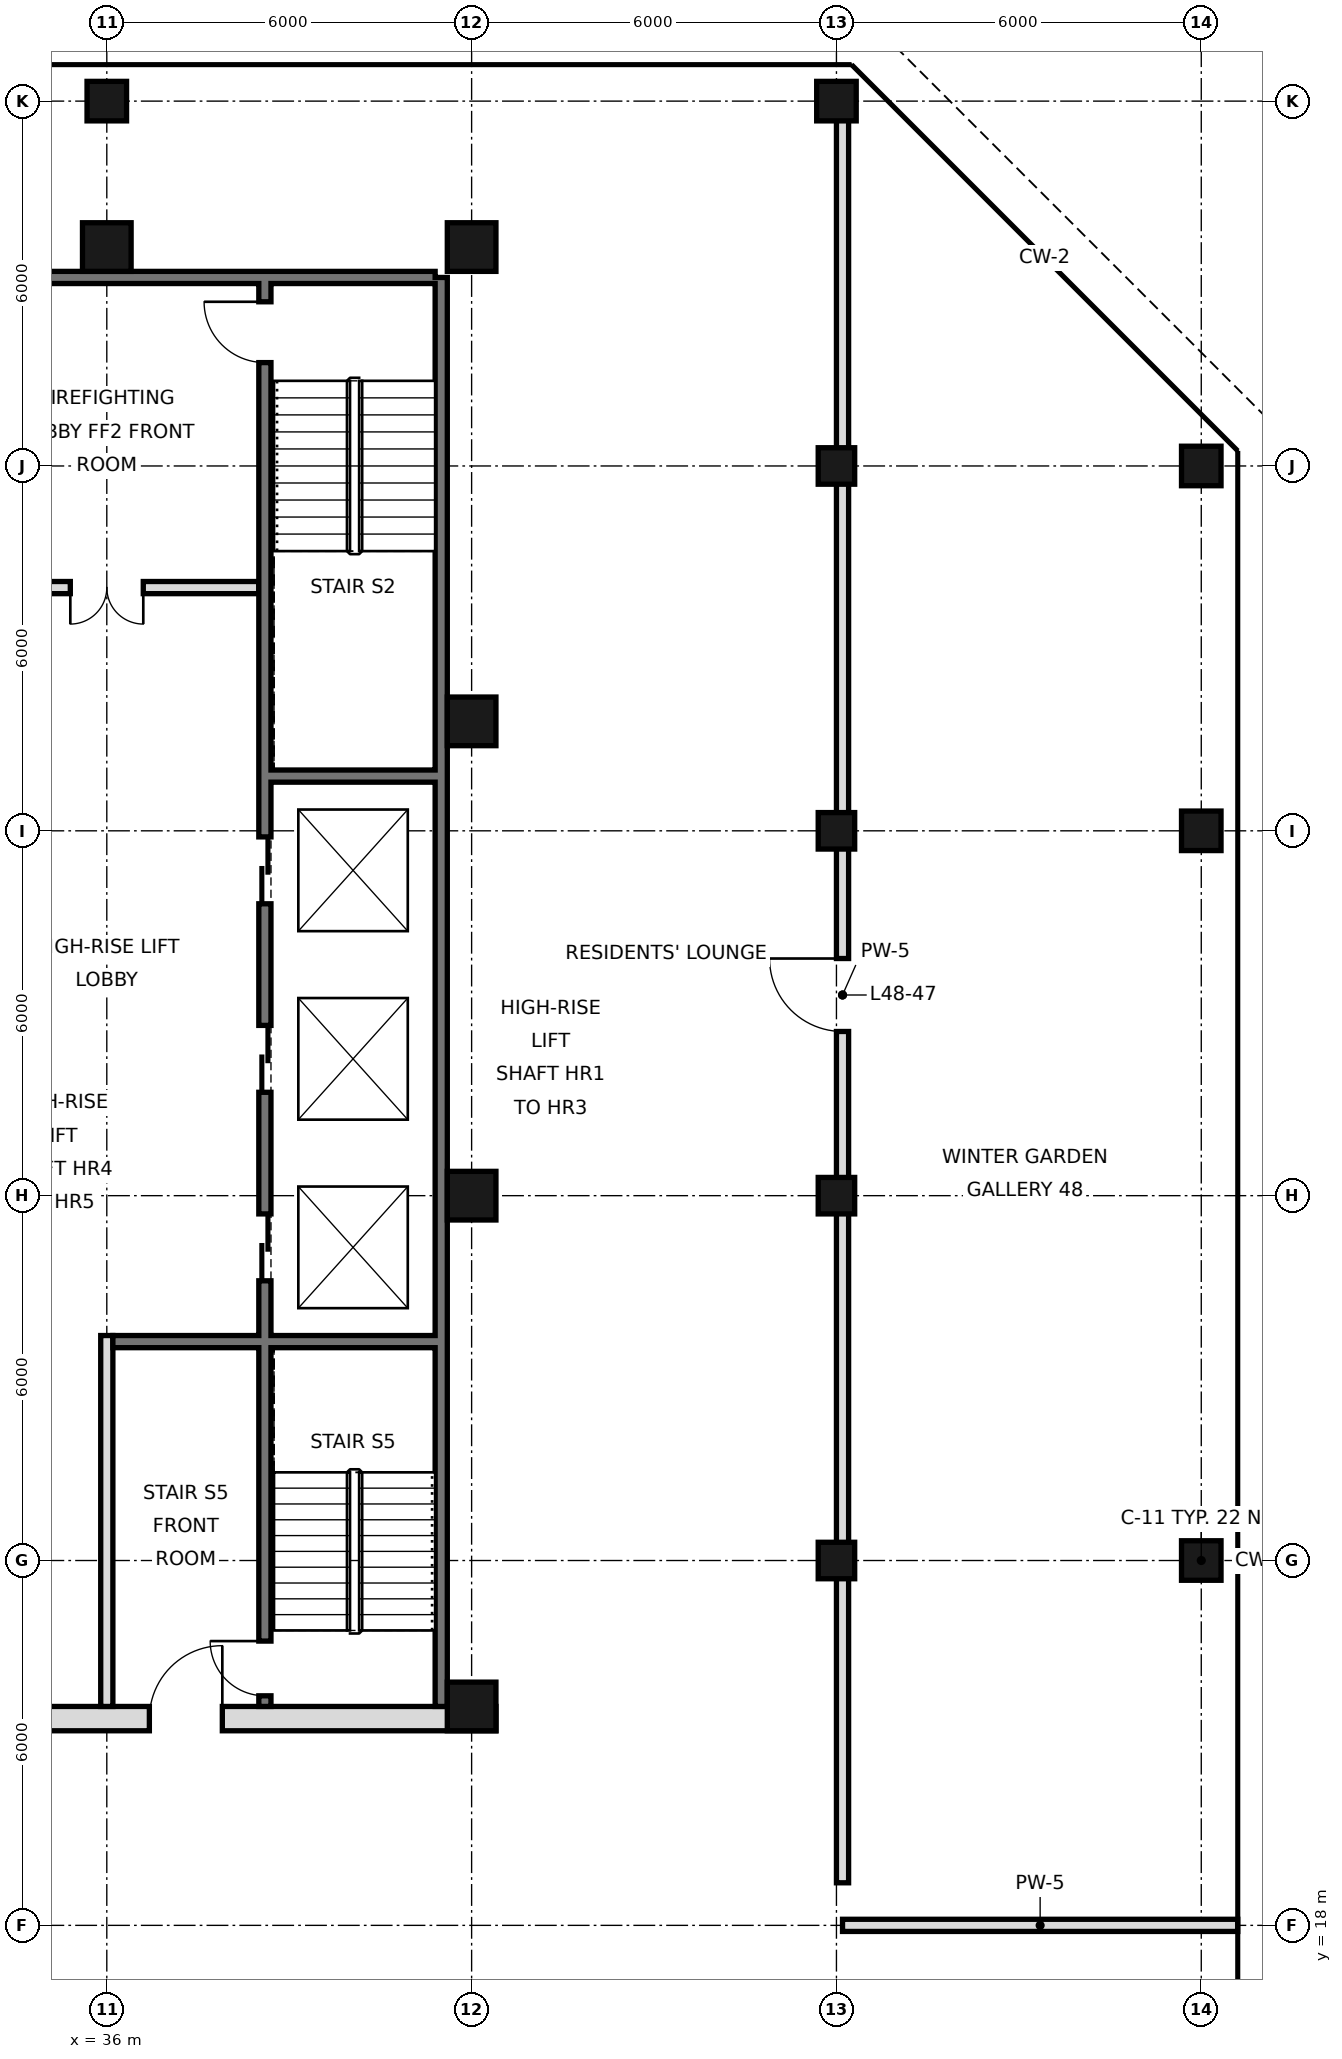
"""IFC4 building model, lengths in metres.
Left out: names, types, materials, properties, quantities, classifications, styles, units other than length and angle.
Written with IfcOpenShell. Run it as: python <this file> out.ifc"""

import sys

from ifc_helpers import new_model, si_unit, direction, frame, frame_2d, origin, origin_2d, place, context, subcontext, project, spatial, rectangle, hollow_rectangle, extrude, element, fill, save


model = new_model("IFC4")
c1 = context("Model", 3, precision=1e-05, world=origin(), true_north=direction((0.0, 1.0)))
c2 = subcontext(c1, "Body", "Model", "MODEL_VIEW")
j1 = project(units=[si_unit("LENGTHUNIT", "METRE"), si_unit("PLANEANGLEUNIT", "RADIAN")], contexts=[c1])
p1 = place(None, origin())
s1 = spatial("IfcSite", under=j1, at=p1, CompositionType="ELEMENT")
p2 = place(p1, origin())
s2 = spatial("IfcBuilding", under=s1, at=p2, CompositionType="ELEMENT")
p3 = place(p2, frame((0.0, 0.0, 206.4)))
s3 = spatial("IfcBuildingStorey", under=s2, at=p3, CompositionType="ELEMENT", Elevation=206.4)
p4 = place(p3, frame((36.0, 45.6, 0.0), z_axis=(0.0, 0.0, 1.0), x_axis=(1.0, 0.0, 0.0)))
e1 = element("IfcColumn", 1, at=p4, inside=s3, PredefinedType="COLUMN", context=c2, shape_type="SweptSolid", body=[
    extrude(hollow_rectangle(XDim=0.8, YDim=0.8, WallThickness=0.04, at=origin_2d()), origin(), (0.0, 0.0, 1.0), 3.6),
])
p5 = place(p3, frame((36.0, 48.0, 0.0), z_axis=(0.0, 0.0, 1.0), x_axis=(1.0, 0.0, 0.0)))
e2 = element("IfcColumn", 2, at=p5, inside=s3, PredefinedType="COLUMN", context=c2, shape_type="SweptSolid", body=[
    extrude(hollow_rectangle(XDim=0.65, YDim=0.65, WallThickness=0.032, at=origin_2d()), origin(), (0.0, 0.0, 1.0), 3.6),
])
for number, where, z_axis, x_axis in (
    (3, (42.0, 21.6, 0.0), (0.0, 0.0, 1.0), (1.0, 0.0, 0.0)),
    (4, (42.0, 30.0, 0.0), (0.0, 0.0, 1.0), (1.0, 0.0, 0.0)),
    (5, (42.0, 37.8, 0.0), (0.0, 0.0, 1.0), (1.0, 0.0, 0.0)),
    (6, (42.0, 45.6, 0.0), (0.0, 0.0, 1.0), (1.0, 0.0, 0.0)),
):
    element("IfcColumn", number, at=place(p3, frame(where, z_axis=z_axis, x_axis=x_axis)), inside=s3, PredefinedType="COLUMN", context=c2, shape_type="SweptSolid", body=[
        extrude(hollow_rectangle(XDim=0.8, YDim=0.8, WallThickness=0.04, at=origin_2d()), origin(), (0.0, 0.0, 1.0), 3.6),
    ])
for number, where, z_axis, x_axis in (
    (7, (48.0, 24.0, 0.0), (0.0, 0.0, 1.0), (1.0, 0.0, 0.0)),
    (8, (48.0, 30.0, 0.0), (0.0, 0.0, 1.0), (1.0, 0.0, 0.0)),
    (9, (48.0, 36.0, 0.0), (0.0, 0.0, 1.0), (1.0, 0.0, 0.0)),
    (10, (48.0, 42.0, 0.0), (0.0, 0.0, 1.0), (1.0, 0.0, 0.0)),
):
    element("IfcColumn", number, at=place(p3, frame(where, z_axis=z_axis, x_axis=x_axis)), inside=s3, PredefinedType="COLUMN", context=c2, shape_type="SweptSolid", body=[
        extrude(hollow_rectangle(XDim=0.6, YDim=0.6, WallThickness=0.028, at=origin_2d()), origin(), (0.0, 0.0, 1.0), 3.6),
    ])
for number, where, z_axis, x_axis in (
    (11, (48.0, 48.0, 0.0), (0.0, 0.0, 1.0), (1.0, 0.0, 0.0)),
    (12, (54.0, 24.0, 0.0), (0.0, 0.0, 1.0), (1.0, 0.0, 0.0)),
    (13, (54.0, 36.0, 0.0), (0.0, 0.0, 1.0), (1.0, 0.0, 0.0)),
    (14, (54.0, 42.0, 0.0), (0.0, 0.0, 1.0), (1.0, 0.0, 0.0)),
):
    element("IfcColumn", number, at=place(p3, frame(where, z_axis=z_axis, x_axis=x_axis)), inside=s3, PredefinedType="COLUMN", context=c2, shape_type="SweptSolid", body=[
        extrude(hollow_rectangle(XDim=0.65, YDim=0.65, WallThickness=0.032, at=origin_2d()), origin(), (0.0, 0.0, 1.0), 3.6),
    ])
p6 = place(p3, frame((48.1, 18.7, 0.0), z_axis=(0.0, 0.0, 1.0), x_axis=(0.0, 1.0, 0.0)))
e15 = element("IfcWall", 15, at=p6, inside=s3, PredefinedType="SOLIDWALL", context=c2, shape_type="SweptSolid", body=[
    extrude(rectangle(XDim=29.2, YDim=0.2, at=frame_2d((14.6, 0.0))), origin(), (0.0, 0.0, 1.0), 2.68),
])
p7 = place(p6, frame((14.0, 0.0, 0.0)))
e16 = element("IfcOpeningElement", 16, at=p7, cuts=e15, PredefinedType="OPENING", context=c2, shape_type="SweptSolid", body=[
    extrude(rectangle(XDim=1.2, YDim=2.4, at=frame_2d((0.6, 1.2))), frame((0.0, 0.11, 0.0), z_axis=(0.0, -1.0, 0.0), x_axis=(1.0, 0.0, 0.0)), (0.0, 0.0, 1.0), 0.22),
])
p8 = place(p3, frame((48.1, 18.0, 0.0), z_axis=(0.0, 0.0, 1.0), x_axis=(1.0, 0.0, 0.0)))
e17 = element("IfcWall", 17, at=p8, inside=s3, PredefinedType="SOLIDWALL", context=c2, shape_type="SweptSolid", body=[
    extrude(rectangle(XDim=6.5, YDim=0.2, at=frame_2d((3.25, 0.0))), origin(), (0.0, 0.0, 1.0), 2.68),
])
p9 = place(p3, frame((41.5, 21.6, 0.0), z_axis=(0.0, 0.0, 1.0), x_axis=(0.0, 1.0, 0.0)))
e18 = element("IfcWall", 18, at=p9, inside=s3, PredefinedType="SOLIDWALL", context=c2, shape_type="SweptSolid", body=[
    extrude(rectangle(XDim=23.5, YDim=0.2, at=frame_2d((11.75, 0.0))), origin(), (0.0, 0.0, 1.0), 3.38),
])
p10 = place(p3, frame((6.6, 45.1, 0.0), z_axis=(0.0, 0.0, 1.0), x_axis=(1.0, 0.0, 0.0)))
e19 = element("IfcWall", 19, at=p10, inside=s3, PredefinedType="SOLIDWALL", context=c2, shape_type="SweptSolid", body=[
    extrude(rectangle(XDim=34.8, YDim=0.2, at=frame_2d((17.4, 0.0))), origin(), (0.0, 0.0, 1.0), 3.38),
])
p11 = place(p3, frame((5.6, 21.4, 0.0), z_axis=(0.0, 0.0, 1.0), x_axis=(1.0, 0.0, 0.0)))
e20 = element("IfcWall", 20, at=p11, inside=s3, PredefinedType="SOLIDWALL", context=c2, shape_type="SweptSolid", body=[
    extrude(rectangle(XDim=36.8, YDim=0.4, at=frame_2d((18.4, 0.0))), origin(), (0.0, 0.0, 1.0), 3.38),
])
p12 = place(p11, frame((8.5, 0.0, 0.0)))
e21 = element("IfcOpeningElement", 21, at=p12, cuts=e20, PredefinedType="OPENING", context=c2, shape_type="SweptSolid", body=[
    extrude(rectangle(XDim=1.8, YDim=2.1, at=frame_2d((0.9, 1.05))), frame((0.0, 0.21, 0.0), z_axis=(0.0, -1.0, 0.0), x_axis=(1.0, 0.0, 0.0)), (0.0, 0.0, 1.0), 0.42),
])
p13 = place(p11, frame((17.5, 0.0, 0.0)))
e22 = element("IfcOpeningElement", 22, at=p13, cuts=e20, PredefinedType="OPENING", context=c2, shape_type="SweptSolid", body=[
    extrude(rectangle(XDim=1.8, YDim=2.1, at=frame_2d((0.9, 1.05))), frame((0.0, 0.21, 0.0), z_axis=(0.0, -1.0, 0.0), x_axis=(1.0, 0.0, 0.0)), (0.0, 0.0, 1.0), 0.42),
])
p14 = place(p11, frame((26.5, 0.0, 0.0)))
e23 = element("IfcOpeningElement", 23, at=p14, cuts=e20, PredefinedType="OPENING", context=c2, shape_type="SweptSolid", body=[
    extrude(rectangle(XDim=1.8, YDim=2.1, at=frame_2d((0.9, 1.05))), frame((0.0, 0.21, 0.0), z_axis=(0.0, -1.0, 0.0), x_axis=(1.0, 0.0, 0.0)), (0.0, 0.0, 1.0), 0.42),
])
p15 = place(p11, frame((4.5, 0.0, 0.0)))
e24 = element("IfcOpeningElement", 24, at=p15, cuts=e20, PredefinedType="OPENING", context=c2, shape_type="SweptSolid", body=[
    extrude(rectangle(XDim=1.2, YDim=2.1, at=frame_2d((0.6, 1.05))), frame((0.0, 0.21, 0.0), z_axis=(0.0, -1.0, 0.0), x_axis=(1.0, 0.0, 0.0)), (0.0, 0.0, 1.0), 0.42),
])
p16 = place(p11, frame((31.1, 0.0, 0.0)))
e25 = element("IfcOpeningElement", 25, at=p16, cuts=e20, PredefinedType="OPENING", context=c2, shape_type="SweptSolid", body=[
    extrude(rectangle(XDim=1.2, YDim=2.1, at=frame_2d((0.6, 1.05))), frame((0.0, 0.21, 0.0), z_axis=(0.0, -1.0, 0.0), x_axis=(1.0, 0.0, 0.0)), (0.0, 0.0, 1.0), 0.42),
])
p17 = place(p3, frame((36.0, 21.6, 0.0), z_axis=(0.0, 0.0, 1.0), x_axis=(0.0, 1.0, 0.0)))
e26 = element("IfcWall", 26, at=p17, inside=s3, PredefinedType="PARTITIONING", context=c2, shape_type="SweptSolid", body=[
    extrude(rectangle(XDim=6.1, YDim=0.2, at=frame_2d((3.05, 0.0))), origin(), (0.0, 0.0, 1.0), 3.38),
])
p18 = place(p3, frame((38.6, 21.6, 0.0), z_axis=(0.0, 0.0, 1.0), x_axis=(0.0, 1.0, 0.0)))
e27 = element("IfcWall", 27, at=p18, inside=s3, PredefinedType="SOLIDWALL", context=c2, shape_type="SweptSolid", body=[
    extrude(rectangle(XDim=23.4, YDim=0.2, at=frame_2d((11.7, 0.0))), origin(), (0.0, 0.0, 1.0), 3.38),
])
p19 = place(p18, frame((7.0, 0.0, 0.0)))
e28 = element("IfcOpeningElement", 28, at=p19, cuts=e27, PredefinedType="OPENING", context=c2, shape_type="SweptSolid", body=[
    extrude(rectangle(XDim=1.1, YDim=2.1, at=frame_2d((0.55, 1.05))), frame((0.0, 0.11, 0.0), z_axis=(0.0, -1.0, 0.0), x_axis=(1.0, 0.0, 0.0)), (0.0, 0.0, 1.0), 0.22),
])
p20 = place(p18, frame((10.1, 0.0, 0.0)))
e29 = element("IfcOpeningElement", 29, at=p20, cuts=e27, PredefinedType="OPENING", context=c2, shape_type="SweptSolid", body=[
    extrude(rectangle(XDim=1.1, YDim=2.1, at=frame_2d((0.55, 1.05))), frame((0.0, 0.11, 0.0), z_axis=(0.0, -1.0, 0.0), x_axis=(1.0, 0.0, 0.0)), (0.0, 0.0, 1.0), 0.22),
])
p21 = place(p18, frame((13.2, 0.0, 0.0)))
e30 = element("IfcOpeningElement", 30, at=p21, cuts=e27, PredefinedType="OPENING", context=c2, shape_type="SweptSolid", body=[
    extrude(rectangle(XDim=1.1, YDim=2.1, at=frame_2d((0.55, 1.05))), frame((0.0, 0.11, 0.0), z_axis=(0.0, -1.0, 0.0), x_axis=(1.0, 0.0, 0.0)), (0.0, 0.0, 1.0), 0.22),
])
p22 = place(p18, frame((22.1, 0.0, 0.0)))
e31 = element("IfcOpeningElement", 31, at=p22, cuts=e27, PredefinedType="OPENING", context=c2, shape_type="SweptSolid", body=[
    extrude(rectangle(XDim=1.0, YDim=2.1, at=frame_2d((0.5, 1.05))), frame((0.0, 0.11, 0.0), z_axis=(0.0, -1.0, 0.0), x_axis=(1.0, 0.0, 0.0)), (0.0, 0.0, 1.0), 0.22),
])
p23 = place(p18, frame((0.175, 0.0, 0.0)))
e32 = element("IfcOpeningElement", 32, at=p23, cuts=e27, PredefinedType="OPENING", context=c2, shape_type="SweptSolid", body=[
    extrude(rectangle(XDim=0.9, YDim=2.1, at=frame_2d((0.45, 1.05))), frame((0.0, 0.11, 0.0), z_axis=(0.0, -1.0, 0.0), x_axis=(1.0, 0.0, 0.0)), (0.0, 0.0, 1.0), 0.22),
])
p24 = place(p3, frame((36.1, 27.6, 0.0), z_axis=(0.0, 0.0, 1.0), x_axis=(1.0, 0.0, 0.0)))
e33 = element("IfcWall", 33, at=p24, inside=s3, PredefinedType="SOLIDWALL", context=c2, shape_type="SweptSolid", body=[
    extrude(rectangle(XDim=5.3, YDim=0.2, at=frame_2d((2.65, 0.0))), origin(), (0.0, 0.0, 1.0), 3.38),
])
p25 = place(p3, frame((38.7, 36.9, 0.0), z_axis=(0.0, 0.0, 1.0), x_axis=(1.0, 0.0, 0.0)))
e34 = element("IfcWall", 34, at=p25, inside=s3, PredefinedType="SOLIDWALL", context=c2, shape_type="SweptSolid", body=[
    extrude(rectangle(XDim=2.7, YDim=0.2, at=frame_2d((1.35, 0.0))), origin(), (0.0, 0.0, 1.0), 3.38),
])
p26 = place(p3, frame((33.5, 40.0, 0.0), z_axis=(0.0, 0.0, 1.0), x_axis=(1.0, 0.0, 0.0)))
e35 = element("IfcWall", 35, at=p26, inside=s3, PredefinedType="PARTITIONING", context=c2, shape_type="SweptSolid", body=[
    extrude(rectangle(XDim=5.0, YDim=0.2, at=frame_2d((2.5, 0.0))), origin(), (0.0, 0.0, 1.0), 3.38),
])
p27 = place(p26, frame((1.9, 0.0, 0.0)))
e36 = element("IfcOpeningElement", 36, at=p27, cuts=e35, PredefinedType="OPENING", context=c2, shape_type="SweptSolid", body=[
    extrude(rectangle(XDim=1.2, YDim=2.1, at=frame_2d((0.6, 1.05))), frame((0.0, 0.11, 0.0), z_axis=(0.0, -1.0, 0.0), x_axis=(1.0, 0.0, 0.0)), (0.0, 0.0, 1.0), 0.22),
])
p28 = place(p7, frame((1.2, 0.0, 0.0), z_axis=(0.0, 0.0, 1.0), x_axis=(-1.0, 0.0, 0.0)))
e37 = element("IfcDoor", 37, at=p28, inside=s3, OperationType="SINGLE_SWING_LEFT", PredefinedType="DOOR", context=c2, shape_type="SweptSolid", body=[
    extrude(rectangle(XDim=1.2, YDim=2.4, at=frame_2d((0.6, 1.2))), frame((0.0, 0.025, 0.0), z_axis=(0.0, -1.0, 0.0), x_axis=(1.0, 0.0, 0.0)), (0.0, 0.0, 1.0), 0.05),
])
fill(e16, e37)
p29 = place(p16, frame((1.2, 0.0, 0.0), z_axis=(0.0, 0.0, 1.0), x_axis=(-1.0, 0.0, 0.0)))
e38 = element("IfcDoor", 38, at=p29, inside=s3, OperationType="SINGLE_SWING_LEFT", PredefinedType="DOOR", context=c2, shape_type="SweptSolid", body=[
    extrude(rectangle(XDim=1.2, YDim=2.1, at=frame_2d((0.6, 1.05))), frame((0.0, 0.025, 0.0), z_axis=(0.0, -1.0, 0.0), x_axis=(1.0, 0.0, 0.0)), (0.0, 0.0, 1.0), 0.05),
])
fill(e25, e38)
p30 = place(p27, frame((1.2, 0.0, 0.0), z_axis=(0.0, 0.0, 1.0), x_axis=(-1.0, 0.0, 0.0)))
e39 = element("IfcDoor", 39, at=p30, inside=s3, OperationType="DOUBLE_DOOR_SINGLE_SWING", PredefinedType="DOOR", context=c2, shape_type="SweptSolid", body=[
    extrude(rectangle(XDim=1.2, YDim=2.1, at=frame_2d((0.6, 1.05))), frame((0.0, 0.025, 0.0), z_axis=(0.0, -1.0, 0.0), x_axis=(1.0, 0.0, 0.0)), (0.0, 0.0, 1.0), 0.05),
])
fill(e36, e39)
p31 = place(p19, origin())
e40 = element("IfcDoor", 40, at=p31, inside=s3, OperationType="DOUBLE_DOOR_SLIDING", PredefinedType="DOOR", context=c2, shape_type="SweptSolid", body=[
    extrude(rectangle(XDim=1.1, YDim=2.1, at=frame_2d((0.55, 1.05))), frame((0.0, 0.025, 0.0), z_axis=(0.0, -1.0, 0.0), x_axis=(1.0, 0.0, 0.0)), (0.0, 0.0, 1.0), 0.05),
])
fill(e28, e40)
p32 = place(p20, origin())
e41 = element("IfcDoor", 41, at=p32, inside=s3, OperationType="DOUBLE_DOOR_SLIDING", PredefinedType="DOOR", context=c2, shape_type="SweptSolid", body=[
    extrude(rectangle(XDim=1.1, YDim=2.1, at=frame_2d((0.55, 1.05))), frame((0.0, 0.025, 0.0), z_axis=(0.0, -1.0, 0.0), x_axis=(1.0, 0.0, 0.0)), (0.0, 0.0, 1.0), 0.05),
])
fill(e29, e41)
p33 = place(p21, origin())
e42 = element("IfcDoor", 42, at=p33, inside=s3, OperationType="DOUBLE_DOOR_SLIDING", PredefinedType="DOOR", context=c2, shape_type="SweptSolid", body=[
    extrude(rectangle(XDim=1.1, YDim=2.1, at=frame_2d((0.55, 1.05))), frame((0.0, 0.025, 0.0), z_axis=(0.0, -1.0, 0.0), x_axis=(1.0, 0.0, 0.0)), (0.0, 0.0, 1.0), 0.05),
])
fill(e30, e42)
p34 = place(p22, frame((1.0, 0.0, 0.0), z_axis=(0.0, 0.0, 1.0), x_axis=(-1.0, 0.0, 0.0)))
e43 = element("IfcDoor", 43, at=p34, inside=s3, OperationType="SINGLE_SWING_LEFT", PredefinedType="DOOR", context=c2, shape_type="SweptSolid", body=[
    extrude(rectangle(XDim=1.0, YDim=2.1, at=frame_2d((0.5, 1.05))), frame((0.0, 0.025, 0.0), z_axis=(0.0, -1.0, 0.0), x_axis=(1.0, 0.0, 0.0)), (0.0, 0.0, 1.0), 0.05),
])
fill(e31, e43)
p35 = place(p23, frame((0.9, 0.0, 0.0), z_axis=(0.0, 0.0, 1.0), x_axis=(-1.0, 0.0, 0.0)))
e44 = element("IfcDoor", 44, at=p35, inside=s3, OperationType="SINGLE_SWING_LEFT", PredefinedType="DOOR", context=c2, shape_type="SweptSolid", body=[
    extrude(rectangle(XDim=0.9, YDim=2.1, at=frame_2d((0.45, 1.05))), frame((0.0, 0.025, 0.0), z_axis=(0.0, -1.0, 0.0), x_axis=(1.0, 0.0, 0.0)), (0.0, 0.0, 1.0), 0.05),
])
fill(e32, e44)
save(model, sys.argv[1])
